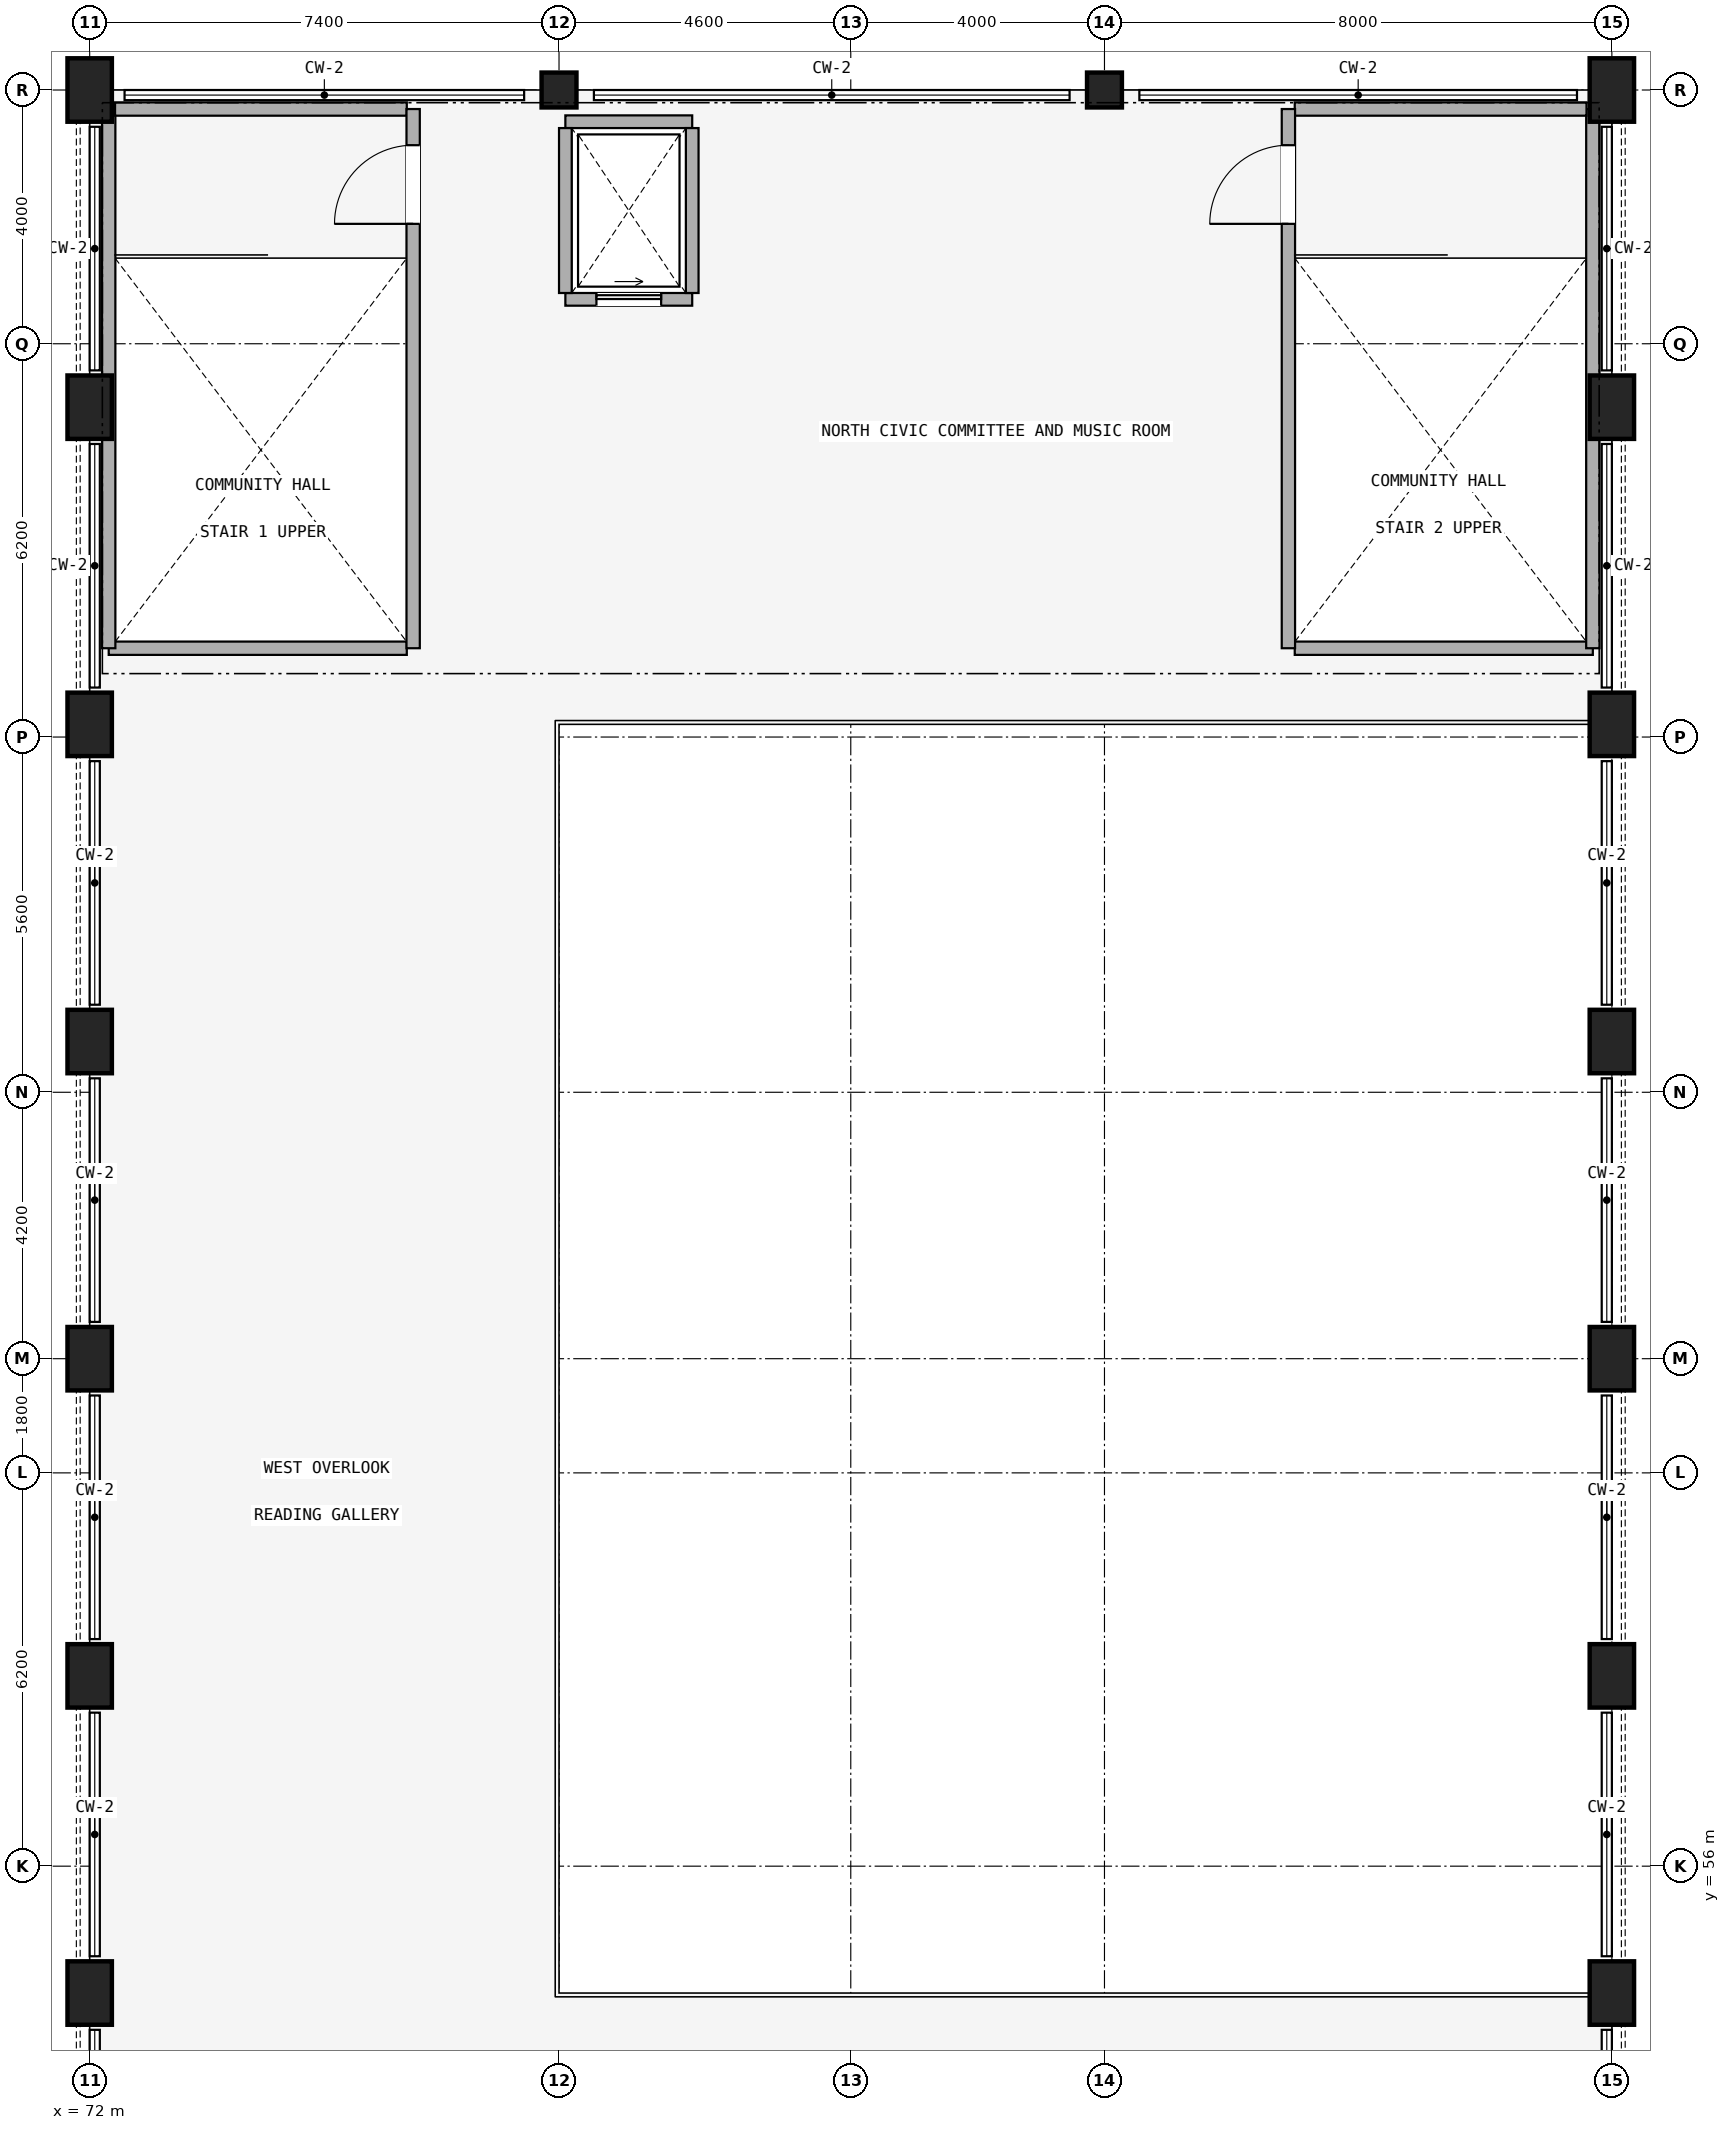
"""IFC4 building model, lengths in metres.
Left out: names, types, materials, properties, quantities, classifications, styles, units other than length and angle.
Written with IfcOpenShell. Run it as: python <this file> out.ifc"""

import sys

from ifc_helpers import new_model, si_unit, direction, frame, frame_2d, origin, origin_2d, place, context, subcontext, project, spatial, rectangle, extrude, element, fill, save


model = new_model("IFC4")
c1 = context("Model", 3, precision=1e-05, world=origin(), true_north=direction((0.0, 1.0)))
c2 = subcontext(c1, "Body", "Model", "MODEL_VIEW")
j1 = project(units=[si_unit("LENGTHUNIT", "METRE"), si_unit("PLANEANGLEUNIT", "RADIAN")], contexts=[c1])
p1 = place(None, origin())
s1 = spatial("IfcSite", under=j1, at=p1, CompositionType="ELEMENT")
p2 = place(p1, origin())
s2 = spatial("IfcBuilding", under=s1, at=p2, CompositionType="ELEMENT")
p3 = place(p2, frame((0.0, 0.0, 4.5)))
s3 = spatial("IfcBuildingStorey", under=s2, at=p3, CompositionType="ELEMENT", Elevation=4.5)
for number, where, z_axis, x_axis in (
    (1, (72.0, 54.0, 0.0), (0.0, 0.0, 1.0), (1.0, 0.0, 0.0)),
    (2, (96.0, 54.0, 0.0), (0.0, 0.0, 1.0), (1.0, 0.0, 0.0)),
    (3, (72.0, 59.0, 0.0), (0.0, 0.0, 1.0), (1.0, 0.0, 0.0)),
    (4, (96.0, 59.0, 0.0), (0.0, 0.0, 1.0), (1.0, 0.0, 0.0)),
    (5, (72.0, 64.0, 0.0), (0.0, 0.0, 1.0), (1.0, 0.0, 0.0)),
    (6, (96.0, 64.0, 0.0), (0.0, 0.0, 1.0), (1.0, 0.0, 0.0)),
    (7, (72.0, 69.0, 0.0), (0.0, 0.0, 1.0), (1.0, 0.0, 0.0)),
    (8, (96.0, 69.0, 0.0), (0.0, 0.0, 1.0), (1.0, 0.0, 0.0)),
    (9, (72.0, 74.0, 0.0), (0.0, 0.0, 1.0), (1.0, 0.0, 0.0)),
    (10, (96.0, 74.0, 0.0), (0.0, 0.0, 1.0), (1.0, 0.0, 0.0)),
    (11, (72.0, 79.0, 0.0), (0.0, 0.0, 1.0), (1.0, 0.0, 0.0)),
    (12, (96.0, 79.0, 0.0), (0.0, 0.0, 1.0), (1.0, 0.0, 0.0)),
    (13, (72.0, 84.0, 0.0), (0.0, 0.0, 1.0), (1.0, 0.0, 0.0)),
    (14, (96.0, 84.0, 0.0), (0.0, 0.0, 1.0), (1.0, 0.0, 0.0)),
):
    element("IfcColumn", number, at=place(p3, frame(where, z_axis=z_axis, x_axis=x_axis)), inside=s3, PredefinedType="COLUMN", context=c2, shape_type="SweptSolid", body=[
        extrude(rectangle(XDim=0.7, YDim=1.0, at=origin_2d()), origin(), (0.0, 0.0, 1.0), 4.2),
    ])
for number, where, z_axis, x_axis in (
    (15, (79.4, 84.0, 0.0), (0.0, 0.0, 1.0), (1.0, 0.0, 0.0)),
    (16, (88.0, 84.0, 0.0), (0.0, 0.0, 1.0), (1.0, 0.0, 0.0)),
):
    element("IfcColumn", number, at=place(p3, frame(where, z_axis=z_axis, x_axis=x_axis)), inside=s3, PredefinedType="COLUMN", context=c2, shape_type="SweptSolid", body=[
        extrude(rectangle(XDim=0.55, YDim=0.55, at=origin_2d()), origin(), (0.0, 0.0, 1.0), 4.2),
    ])
p4 = place(p3, frame((72.3, 75.2, 0.0), z_axis=(0.0, 0.0, 1.0), x_axis=(1.0, 0.0, 0.0)))
e17 = element("IfcWall", 17, at=p4, inside=s3, PredefinedType="STANDARD", context=c2, shape_type="SweptSolid", body=[
    extrude(rectangle(XDim=4.7, YDim=0.21, at=frame_2d((2.35, 0.0))), origin(), (0.0, 0.0, 1.0), 3.092),
])
p5 = place(p3, frame((72.3, 75.2, 0.0), z_axis=(0.0, 0.0, 1.0), x_axis=(0.0, 1.0, 0.0)))
e18 = element("IfcWall", 18, at=p5, inside=s3, PredefinedType="STANDARD", context=c2, shape_type="SweptSolid", body=[
    extrude(rectangle(XDim=8.5, YDim=0.21, at=frame_2d((4.25, 0.0))), origin(), (0.0, 0.0, 1.0), 3.092),
])
p6 = place(p3, frame((72.4, 83.7, 0.0), z_axis=(0.0, 0.0, 1.0), x_axis=(1.0, 0.0, 0.0)))
e19 = element("IfcWall", 19, at=p6, inside=s3, PredefinedType="STANDARD", context=c2, shape_type="SweptSolid", body=[
    extrude(rectangle(XDim=4.6, YDim=0.21, at=frame_2d((2.3, 0.0))), origin(), (0.0, 0.0, 1.0), 3.392),
])
p7 = place(p3, frame((77.1, 75.2, 0.0), z_axis=(0.0, 0.0, 1.0), x_axis=(0.0, 1.0, 0.0)))
e20 = element("IfcWall", 20, at=p7, inside=s3, PredefinedType="STANDARD", context=c2, shape_type="SweptSolid", body=[
    extrude(rectangle(XDim=8.5, YDim=0.21, at=frame_2d((4.25, 0.0))), origin(), (0.0, 0.0, 1.0), 4.1),
])
p8 = place(p7, frame((6.69, 0.0, 0.0)))
e21 = element("IfcOpeningElement", 21, at=p8, cuts=e20, PredefinedType="OPENING", context=c2, shape_type="SweptSolid", body=[
    extrude(rectangle(XDim=1.24, YDim=2.15, at=frame_2d((0.62, 1.075))), frame((0.0, 0.115, 0.0), z_axis=(0.0, -1.0, 0.0), x_axis=(1.0, 0.0, 0.0)), (0.0, 0.0, 1.0), 0.23),
])
p9 = place(p3, frame((91.0, 75.2, 0.0), z_axis=(0.0, 0.0, 1.0), x_axis=(1.0, 0.0, 0.0)))
e22 = element("IfcWall", 22, at=p9, inside=s3, PredefinedType="STANDARD", context=c2, shape_type="SweptSolid", body=[
    extrude(rectangle(XDim=4.7, YDim=0.21, at=frame_2d((2.35, 0.0))), origin(), (0.0, 0.0, 1.0), 3.092),
])
p10 = place(p3, frame((95.7, 75.2, 0.0), z_axis=(0.0, 0.0, 1.0), x_axis=(0.0, 1.0, 0.0)))
e23 = element("IfcWall", 23, at=p10, inside=s3, PredefinedType="STANDARD", context=c2, shape_type="SweptSolid", body=[
    extrude(rectangle(XDim=8.5, YDim=0.21, at=frame_2d((4.25, 0.0))), origin(), (0.0, 0.0, 1.0), 3.092),
])
p11 = place(p3, frame((91.0, 83.7, 0.0), z_axis=(0.0, 0.0, 1.0), x_axis=(1.0, 0.0, 0.0)))
e24 = element("IfcWall", 24, at=p11, inside=s3, PredefinedType="STANDARD", context=c2, shape_type="SweptSolid", body=[
    extrude(rectangle(XDim=4.6, YDim=0.21, at=frame_2d((2.3, 0.0))), origin(), (0.0, 0.0, 1.0), 3.392),
])
p12 = place(p3, frame((90.9, 75.2, 0.0), z_axis=(0.0, 0.0, 1.0), x_axis=(0.0, 1.0, 0.0)))
e25 = element("IfcWall", 25, at=p12, inside=s3, PredefinedType="STANDARD", context=c2, shape_type="SweptSolid", body=[
    extrude(rectangle(XDim=8.5, YDim=0.21, at=frame_2d((4.25, 0.0))), origin(), (0.0, 0.0, 1.0), 4.1),
])
p13 = place(p12, frame((6.69, 0.0, 0.0)))
e26 = element("IfcOpeningElement", 26, at=p13, cuts=e25, PredefinedType="OPENING", context=c2, shape_type="SweptSolid", body=[
    extrude(rectangle(XDim=1.24, YDim=2.15, at=frame_2d((0.62, 1.075))), frame((0.0, 0.115, 0.0), z_axis=(0.0, -1.0, 0.0), x_axis=(1.0, 0.0, 0.0)), (0.0, 0.0, 1.0), 0.23),
])
p14 = place(p3, frame((79.5, 80.7, 0.0), z_axis=(0.0, 0.0, 1.0), x_axis=(1.0, 0.0, 0.0)))
e27 = element("IfcWall", 27, at=p14, inside=s3, PredefinedType="STANDARD", context=c2, shape_type="SweptSolid", body=[
    extrude(rectangle(XDim=2.0, YDim=0.2, at=frame_2d((1.0, 0.0))), origin(), (0.0, 0.0, 1.0), 4.1),
])
p15 = place(p14, frame((0.49, 0.0, 0.0)))
e28 = element("IfcOpeningElement", 28, at=p15, cuts=e27, PredefinedType="OPENING", context=c2, shape_type="SweptSolid", body=[
    extrude(rectangle(XDim=1.02, YDim=2.15, at=frame_2d((0.51, 1.075))), frame((0.0, 0.11, 0.0), z_axis=(0.0, -1.0, 0.0), x_axis=(1.0, 0.0, 0.0)), (0.0, 0.0, 1.0), 0.22),
])
p16 = place(p3, frame((79.5, 83.5, 0.0), z_axis=(0.0, 0.0, 1.0), x_axis=(1.0, 0.0, 0.0)))
e29 = element("IfcWall", 29, at=p16, inside=s3, PredefinedType="STANDARD", context=c2, shape_type="SweptSolid", body=[
    extrude(rectangle(XDim=2.0, YDim=0.2, at=frame_2d((1.0, 0.0))), origin(), (0.0, 0.0, 1.0), 4.1),
])
for number, where, z_axis, x_axis in (
    (30, (79.5, 80.8, 0.0), (0.0, 0.0, 1.0), (0.0, 1.0, 0.0)),
    (31, (81.5, 80.8, 0.0), (0.0, 0.0, 1.0), (0.0, 1.0, 0.0)),
):
    element("IfcWall", number, at=place(p3, frame(where, z_axis=z_axis, x_axis=x_axis)), inside=s3, PredefinedType="STANDARD", context=c2, shape_type="SweptSolid", body=[
        extrude(rectangle(XDim=2.6, YDim=0.2, at=frame_2d((1.3, 0.0))), origin(), (0.0, 0.0, 1.0), 4.1),
    ])
p17 = place(p8, origin())
e32 = element("IfcDoor", 32, at=p17, inside=s3, OperationType="SINGLE_SWING_LEFT", PredefinedType="DOOR", context=c2, shape_type="SweptSolid", body=[
    extrude(rectangle(XDim=1.24, YDim=2.15, at=frame_2d((0.62, 1.075))), frame((0.0, 0.025, 0.0), z_axis=(0.0, -1.0, 0.0), x_axis=(1.0, 0.0, 0.0)), (0.0, 0.0, 1.0), 0.05),
])
fill(e21, e32)
p18 = place(p13, frame((1.24, 0.0, 0.0), z_axis=(0.0, 0.0, 1.0), x_axis=(-1.0, 0.0, 0.0)))
e33 = element("IfcDoor", 33, at=p18, inside=s3, OperationType="SINGLE_SWING_RIGHT", PredefinedType="DOOR", context=c2, shape_type="SweptSolid", body=[
    extrude(rectangle(XDim=1.24, YDim=2.15, at=frame_2d((0.62, 1.075))), frame((0.0, 0.025, 0.0), z_axis=(0.0, -1.0, 0.0), x_axis=(1.0, 0.0, 0.0)), (0.0, 0.0, 1.0), 0.05),
])
fill(e26, e33)
p19 = place(p15, origin())
e34 = element("IfcDoor", 34, at=p19, inside=s3, OperationType="SLIDING_TO_RIGHT", PredefinedType="DOOR", context=c2, shape_type="SweptSolid", body=[
    extrude(rectangle(XDim=1.02, YDim=2.15, at=frame_2d((0.51, 1.075))), frame((0.0, 0.025, 0.0), z_axis=(0.0, -1.0, 0.0), x_axis=(1.0, 0.0, 0.0)), (0.0, 0.0, 1.0), 0.05),
])
fill(e28, e34)
save(model, sys.argv[1])
